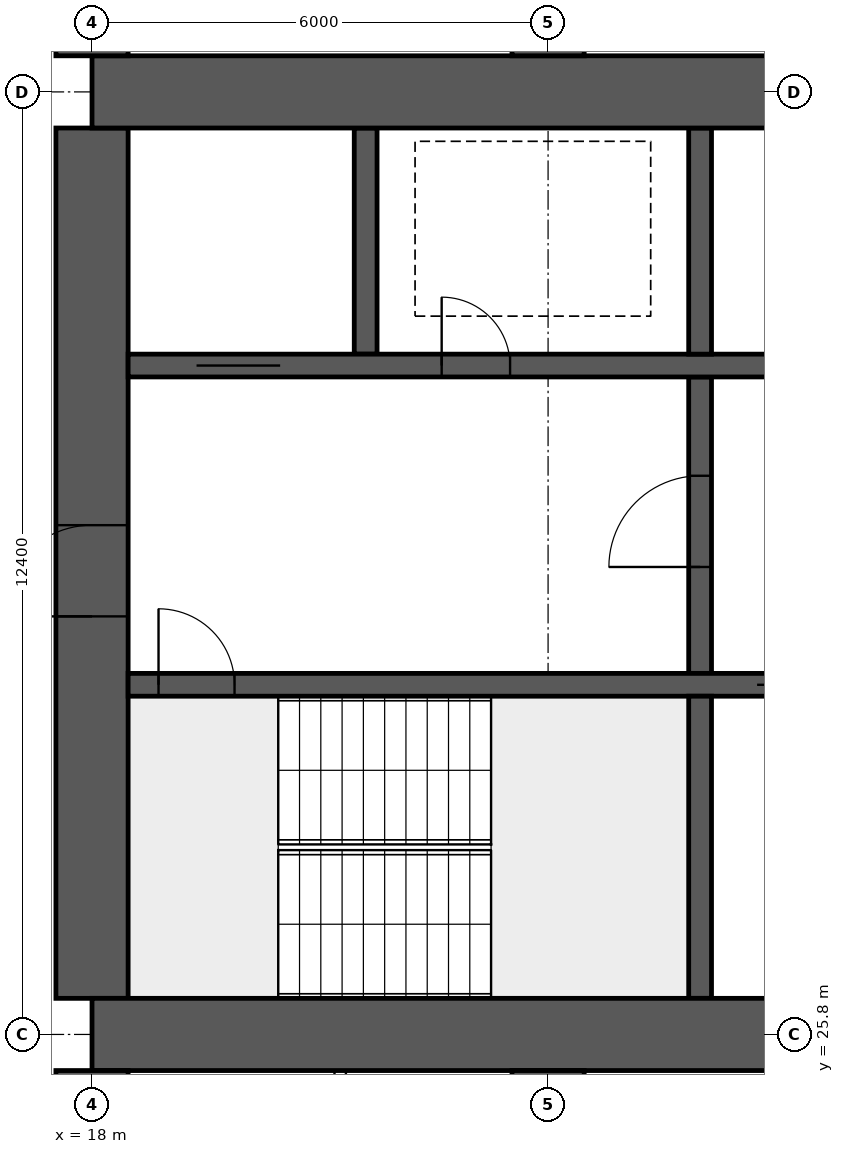
"""IFC4 building model, lengths in metres.
Left out: names, types, materials, properties, quantities, classifications, styles, units other than length and angle.
Written with IfcOpenShell. Run it as: python <this file> out.ifc"""

import sys

from ifc_helpers import new_model, si_unit, direction, frame, frame_2d, origin, place, context, subcontext, project, spatial, rectangle, extrude, element, fill, save


model = new_model("IFC4")
c1 = context("Model", 3, precision=1e-05, world=origin(), true_north=direction((0.0, 1.0)))
c2 = subcontext(c1, "Body", "Model", "MODEL_VIEW")
j1 = project(units=[si_unit("LENGTHUNIT", "METRE"), si_unit("PLANEANGLEUNIT", "RADIAN")], contexts=[c1])
p1 = place(None, origin())
s1 = spatial("IfcSite", under=j1, at=p1, CompositionType="ELEMENT")
p2 = place(p1, origin())
s2 = spatial("IfcBuilding", under=s1, at=p2, CompositionType="ELEMENT")
p3 = place(p2, frame((0.0, 0.0, 80.65)))
s3 = spatial("IfcBuildingStorey", under=s2, at=p3, CompositionType="ELEMENT", Elevation=80.65)
for number, where, z_axis, x_axis in (
    (1, (18.0, 25.8, 0.0), (0.0, 0.0, 1.0), (1.0, 0.0, 0.0)),
    (2, (18.0, 38.2, 0.0), (0.0, 0.0, 1.0), (1.0, 0.0, 0.0)),
):
    element("IfcWall", number, at=place(p3, frame(where, z_axis=z_axis, x_axis=x_axis)), inside=s3, PredefinedType="SHEAR", context=c2, shape_type="SweptSolid", body=[
        extrude(rectangle(XDim=48.0, YDim=0.95, at=frame_2d((24.0, 0.0))), origin(), (0.0, 0.0, 1.0), 3.75),
    ])
p4 = place(p3, frame((18.0, 26.275, 0.0), z_axis=(0.0, 0.0, 1.0), x_axis=(0.0, 1.0, 0.0)))
e3 = element("IfcWall", 3, at=p4, inside=s3, PredefinedType="SHEAR", context=c2, shape_type="SweptSolid", body=[
    extrude(rectangle(XDim=11.45, YDim=0.95, at=frame_2d((5.725, 0.0))), origin(), (0.0, 0.0, 1.0), 3.75),
])
p5 = place(p4, frame((5.025, 0.0, 0.0)))
e4 = element("IfcOpeningElement", 4, at=p5, cuts=e3, PredefinedType="OPENING", context=c2, shape_type="SweptSolid", body=[
    extrude(rectangle(XDim=1.2, YDim=2.1, at=frame_2d((0.6, 1.05))), frame((0.0, 0.485, 0.0), z_axis=(0.0, -1.0, 0.0), x_axis=(1.0, 0.0, 0.0)), (0.0, 0.0, 1.0), 0.97),
])
p6 = place(p3, frame((18.475, 30.4, 0.0), z_axis=(0.0, 0.0, 1.0), x_axis=(1.0, 0.0, 0.0)))
e5 = element("IfcWall", 5, at=p6, inside=s3, PredefinedType="SHEAR", context=c2, shape_type="SweptSolid", body=[
    extrude(rectangle(XDim=47.05, YDim=0.3, at=frame_2d((23.525, 0.0))), origin(), (0.0, 0.0, 1.0), 3.75),
])
p7 = place(p6, frame((0.4, 0.0, 0.0)))
e6 = element("IfcOpeningElement", 6, at=p7, cuts=e5, PredefinedType="OPENING", context=c2, shape_type="SweptSolid", body=[
    extrude(rectangle(XDim=1.0, YDim=2.1, at=frame_2d((0.5, 1.05))), frame((0.0, 0.16, 0.0), z_axis=(0.0, -1.0, 0.0), x_axis=(1.0, 0.0, 0.0)), (0.0, 0.0, 1.0), 0.32),
])
p8 = place(p6, frame((45.65, 0.0, 0.0)))
e7 = element("IfcOpeningElement", 7, at=p8, cuts=e5, PredefinedType="OPENING", context=c2, shape_type="SweptSolid", body=[
    extrude(rectangle(XDim=1.0, YDim=2.1, at=frame_2d((0.5, 1.05))), frame((0.0, 0.16, 0.0), z_axis=(0.0, -1.0, 0.0), x_axis=(1.0, 0.0, 0.0)), (0.0, 0.0, 1.0), 0.32),
])
p9 = place(p6, frame((8.275, 0.0, 0.0)))
e8 = element("IfcOpeningElement", 8, at=p9, cuts=e5, PredefinedType="OPENING", context=c2, shape_type="SweptSolid", body=[
    extrude(rectangle(XDim=1.1, YDim=2.1, at=frame_2d((0.55, 1.05))), frame((0.0, 0.16, 0.0), z_axis=(0.0, -1.0, 0.0), x_axis=(1.0, 0.0, 0.0)), (0.0, 0.0, 1.0), 0.32),
])
p10 = place(p6, frame((10.875, 0.0, 0.0)))
e9 = element("IfcOpeningElement", 9, at=p10, cuts=e5, PredefinedType="OPENING", context=c2, shape_type="SweptSolid", body=[
    extrude(rectangle(XDim=1.1, YDim=2.1, at=frame_2d((0.55, 1.05))), frame((0.0, 0.16, 0.0), z_axis=(0.0, -1.0, 0.0), x_axis=(1.0, 0.0, 0.0)), (0.0, 0.0, 1.0), 0.32),
])
p11 = place(p6, frame((13.475, 0.0, 0.0)))
e10 = element("IfcOpeningElement", 10, at=p11, cuts=e5, PredefinedType="OPENING", context=c2, shape_type="SweptSolid", body=[
    extrude(rectangle(XDim=1.1, YDim=2.1, at=frame_2d((0.55, 1.05))), frame((0.0, 0.16, 0.0), z_axis=(0.0, -1.0, 0.0), x_axis=(1.0, 0.0, 0.0)), (0.0, 0.0, 1.0), 0.32),
])
p12 = place(p6, frame((16.075, 0.0, 0.0)))
e11 = element("IfcOpeningElement", 11, at=p12, cuts=e5, PredefinedType="OPENING", context=c2, shape_type="SweptSolid", body=[
    extrude(rectangle(XDim=1.1, YDim=2.1, at=frame_2d((0.55, 1.05))), frame((0.0, 0.16, 0.0), z_axis=(0.0, -1.0, 0.0), x_axis=(1.0, 0.0, 0.0)), (0.0, 0.0, 1.0), 0.32),
])
p13 = place(p6, frame((30.142, 0.0, 0.0)))
e12 = element("IfcOpeningElement", 12, at=p13, cuts=e5, PredefinedType="OPENING", context=c2, shape_type="SweptSolid", body=[
    extrude(rectangle(XDim=1.1, YDim=2.1, at=frame_2d((0.55, 1.05))), frame((0.0, 0.16, 0.0), z_axis=(0.0, -1.0, 0.0), x_axis=(1.0, 0.0, 0.0)), (0.0, 0.0, 1.0), 0.32),
])
p14 = place(p6, frame((33.675, 0.0, 0.0)))
e13 = element("IfcOpeningElement", 13, at=p14, cuts=e5, PredefinedType="OPENING", context=c2, shape_type="SweptSolid", body=[
    extrude(rectangle(XDim=1.1, YDim=2.1, at=frame_2d((0.55, 1.05))), frame((0.0, 0.16, 0.0), z_axis=(0.0, -1.0, 0.0), x_axis=(1.0, 0.0, 0.0)), (0.0, 0.0, 1.0), 0.32),
])
p15 = place(p6, frame((37.208, 0.0, 0.0)))
e14 = element("IfcOpeningElement", 14, at=p15, cuts=e5, PredefinedType="OPENING", context=c2, shape_type="SweptSolid", body=[
    extrude(rectangle(XDim=1.1, YDim=2.1, at=frame_2d((0.55, 1.05))), frame((0.0, 0.16, 0.0), z_axis=(0.0, -1.0, 0.0), x_axis=(1.0, 0.0, 0.0)), (0.0, 0.0, 1.0), 0.32),
])
p16 = place(p3, frame((18.475, 34.6, 0.0), z_axis=(0.0, 0.0, 1.0), x_axis=(1.0, 0.0, 0.0)))
e15 = element("IfcWall", 15, at=p16, inside=s3, PredefinedType="SHEAR", context=c2, shape_type="SweptSolid", body=[
    extrude(rectangle(XDim=47.05, YDim=0.3, at=frame_2d((23.525, 0.0))), origin(), (0.0, 0.0, 1.0), 3.75),
])
p17 = place(p16, frame((0.9, 0.0, 0.0)))
e16 = element("IfcOpeningElement", 16, at=p17, cuts=e15, PredefinedType="OPENING", context=c2, shape_type="SweptSolid", body=[
    extrude(rectangle(XDim=1.1, YDim=2.1, at=frame_2d((0.55, 1.05))), frame((0.0, 0.16, 0.0), z_axis=(0.0, -1.0, 0.0), x_axis=(1.0, 0.0, 0.0)), (0.0, 0.0, 1.0), 0.32),
])
p18 = place(p16, frame((45.05, 0.0, 0.0)))
e17 = element("IfcOpeningElement", 17, at=p18, cuts=e15, PredefinedType="OPENING", context=c2, shape_type="SweptSolid", body=[
    extrude(rectangle(XDim=1.1, YDim=2.1, at=frame_2d((0.55, 1.05))), frame((0.0, 0.16, 0.0), z_axis=(0.0, -1.0, 0.0), x_axis=(1.0, 0.0, 0.0)), (0.0, 0.0, 1.0), 0.32),
])
p19 = place(p16, frame((4.125, 0.0, 0.0)))
e18 = element("IfcOpeningElement", 18, at=p19, cuts=e15, PredefinedType="OPENING", context=c2, shape_type="SweptSolid", body=[
    extrude(rectangle(XDim=0.9, YDim=2.1, at=frame_2d((0.45, 1.05))), frame((0.0, 0.16, 0.0), z_axis=(0.0, -1.0, 0.0), x_axis=(1.0, 0.0, 0.0)), (0.0, 0.0, 1.0), 0.32),
])
p20 = place(p16, frame((42.025, 0.0, 0.0)))
e19 = element("IfcOpeningElement", 19, at=p20, cuts=e15, PredefinedType="OPENING", context=c2, shape_type="SweptSolid", body=[
    extrude(rectangle(XDim=0.9, YDim=2.1, at=frame_2d((0.45, 1.05))), frame((0.0, 0.16, 0.0), z_axis=(0.0, -1.0, 0.0), x_axis=(1.0, 0.0, 0.0)), (0.0, 0.0, 1.0), 0.32),
])
p21 = place(p16, frame((8.9, 0.0, 0.0)))
e20 = element("IfcOpeningElement", 20, at=p21, cuts=e15, PredefinedType="OPENING", context=c2, shape_type="SweptSolid", body=[
    extrude(rectangle(XDim=0.9, YDim=2.1, at=frame_2d((0.45, 1.05))), frame((0.0, 0.16, 0.0), z_axis=(0.0, -1.0, 0.0), x_axis=(1.0, 0.0, 0.0)), (0.0, 0.0, 1.0), 0.32),
])
p22 = place(p16, frame((12.874, 0.0, 0.0)))
e21 = element("IfcOpeningElement", 21, at=p22, cuts=e15, PredefinedType="OPENING", context=c2, shape_type="SweptSolid", body=[
    extrude(rectangle(XDim=0.9, YDim=2.1, at=frame_2d((0.45, 1.05))), frame((0.0, 0.16, 0.0), z_axis=(0.0, -1.0, 0.0), x_axis=(1.0, 0.0, 0.0)), (0.0, 0.0, 1.0), 0.32),
])
p23 = place(p16, frame((16.521, 0.0, 0.0)))
e22 = element("IfcOpeningElement", 22, at=p23, cuts=e15, PredefinedType="OPENING", context=c2, shape_type="SweptSolid", body=[
    extrude(rectangle(XDim=0.9, YDim=2.1, at=frame_2d((0.45, 1.05))), frame((0.0, 0.16, 0.0), z_axis=(0.0, -1.0, 0.0), x_axis=(1.0, 0.0, 0.0)), (0.0, 0.0, 1.0), 0.32),
])
p24 = place(p16, frame((20.28, 0.0, 0.0)))
e23 = element("IfcOpeningElement", 23, at=p24, cuts=e15, PredefinedType="OPENING", context=c2, shape_type="SweptSolid", body=[
    extrude(rectangle(XDim=0.9, YDim=2.1, at=frame_2d((0.45, 1.05))), frame((0.0, 0.16, 0.0), z_axis=(0.0, -1.0, 0.0), x_axis=(1.0, 0.0, 0.0)), (0.0, 0.0, 1.0), 0.32),
])
p25 = place(p16, frame((24.686, 0.0, 0.0)))
e24 = element("IfcOpeningElement", 24, at=p25, cuts=e15, PredefinedType="OPENING", context=c2, shape_type="SweptSolid", body=[
    extrude(rectangle(XDim=0.9, YDim=2.1, at=frame_2d((0.45, 1.05))), frame((0.0, 0.16, 0.0), z_axis=(0.0, -1.0, 0.0), x_axis=(1.0, 0.0, 0.0)), (0.0, 0.0, 1.0), 0.32),
])
p26 = place(p16, frame((27.483, 0.0, 0.0)))
e25 = element("IfcOpeningElement", 25, at=p26, cuts=e15, PredefinedType="OPENING", context=c2, shape_type="SweptSolid", body=[
    extrude(rectangle(XDim=0.9, YDim=2.1, at=frame_2d((0.45, 1.05))), frame((0.0, 0.16, 0.0), z_axis=(0.0, -1.0, 0.0), x_axis=(1.0, 0.0, 0.0)), (0.0, 0.0, 1.0), 0.32),
])
p27 = place(p16, frame((29.45, 0.0, 0.0)))
e26 = element("IfcOpeningElement", 26, at=p27, cuts=e15, PredefinedType="OPENING", context=c2, shape_type="SweptSolid", body=[
    extrude(rectangle(XDim=0.9, YDim=2.1, at=frame_2d((0.45, 1.05))), frame((0.0, 0.16, 0.0), z_axis=(0.0, -1.0, 0.0), x_axis=(1.0, 0.0, 0.0)), (0.0, 0.0, 1.0), 0.32),
])
p28 = place(p16, frame((31.882, 0.0, 0.0)))
e27 = element("IfcOpeningElement", 27, at=p28, cuts=e15, PredefinedType="OPENING", context=c2, shape_type="SweptSolid", body=[
    extrude(rectangle(XDim=0.9, YDim=2.1, at=frame_2d((0.45, 1.05))), frame((0.0, 0.16, 0.0), z_axis=(0.0, -1.0, 0.0), x_axis=(1.0, 0.0, 0.0)), (0.0, 0.0, 1.0), 0.32),
])
p29 = place(p16, frame((34.617, 0.0, 0.0)))
e28 = element("IfcOpeningElement", 28, at=p29, cuts=e15, PredefinedType="OPENING", context=c2, shape_type="SweptSolid", body=[
    extrude(rectangle(XDim=0.9, YDim=2.1, at=frame_2d((0.45, 1.05))), frame((0.0, 0.16, 0.0), z_axis=(0.0, -1.0, 0.0), x_axis=(1.0, 0.0, 0.0)), (0.0, 0.0, 1.0), 0.32),
])
p30 = place(p16, frame((37.656, 0.0, 0.0)))
e29 = element("IfcOpeningElement", 29, at=p30, cuts=e15, PredefinedType="OPENING", context=c2, shape_type="SweptSolid", body=[
    extrude(rectangle(XDim=0.9, YDim=2.1, at=frame_2d((0.45, 1.05))), frame((0.0, 0.16, 0.0), z_axis=(0.0, -1.0, 0.0), x_axis=(1.0, 0.0, 0.0)), (0.0, 0.0, 1.0), 0.32),
])
p31 = place(p3, frame((26.0, 26.275, 0.0), z_axis=(0.0, 0.0, 1.0), x_axis=(0.0, 1.0, 0.0)))
e30 = element("IfcWall", 30, at=p31, inside=s3, PredefinedType="SHEAR", context=c2, shape_type="SweptSolid", body=[
    extrude(rectangle(XDim=3.975, YDim=0.3, at=frame_2d((1.988, 0.0))), origin(), (0.0, 0.0, 1.0), 3.75),
])
p32 = place(p3, frame((26.0, 30.55, 0.0), z_axis=(0.0, 0.0, 1.0), x_axis=(0.0, 1.0, 0.0)))
e31 = element("IfcWall", 31, at=p32, inside=s3, PredefinedType="SHEAR", context=c2, shape_type="SweptSolid", body=[
    extrude(rectangle(XDim=3.9, YDim=0.3, at=frame_2d((1.95, 0.0))), origin(), (0.0, 0.0, 1.0), 3.75),
])
p33 = place(p32, frame((1.4, 0.0, 0.0)))
e32 = element("IfcOpeningElement", 32, at=p33, cuts=e31, PredefinedType="OPENING", context=c2, shape_type="SweptSolid", body=[
    extrude(rectangle(XDim=1.2, YDim=2.1, at=frame_2d((0.6, 1.05))), frame((0.0, 0.16, 0.0), z_axis=(0.0, -1.0, 0.0), x_axis=(1.0, 0.0, 0.0)), (0.0, 0.0, 1.0), 0.32),
])
for number, where, z_axis, x_axis in (
    (33, (21.6, 34.75, 0.0), (0.0, 0.0, 1.0), (0.0, 1.0, 0.0)),
    (34, (26.0, 34.75, 0.0), (0.0, 0.0, 1.0), (0.0, 1.0, 0.0)),
):
    element("IfcWall", number, at=place(p3, frame(where, z_axis=z_axis, x_axis=x_axis)), inside=s3, PredefinedType="SHEAR", context=c2, shape_type="SweptSolid", body=[
        extrude(rectangle(XDim=2.975, YDim=0.3, at=frame_2d((1.488, 0.0))), origin(), (0.0, 0.0, 1.0), 3.75),
    ])
for number, where, z_axis, x_axis in (
    (35, (18.0, 16.0, 0.0), (0.0, 0.0, 1.0), (0.0, 1.0, 0.0)),
    (36, (18.0, 38.675, 0.0), (0.0, 0.0, 1.0), (0.0, 1.0, 0.0)),
    (37, (24.0, 16.0, 0.0), (0.0, 0.0, 1.0), (0.0, 1.0, 0.0)),
    (38, (24.0, 38.675, 0.0), (0.0, 0.0, 1.0), (0.0, 1.0, 0.0)),
):
    element("IfcWall", number, at=place(p3, frame(where, z_axis=z_axis, x_axis=x_axis)), inside=s3, PredefinedType="SHEAR", context=c2, shape_type="SweptSolid", body=[
        extrude(rectangle(XDim=9.325, YDim=0.95, at=frame_2d((4.663, 0.0))), origin(), (0.0, 0.0, 1.0), 3.75),
    ])
p34 = place(p3, frame((21.265, 16.1, 0.0), z_axis=(0.0, 0.0, 1.0), x_axis=(0.0, 1.0, 0.0)))
e39 = element("IfcWall", 39, at=p34, inside=s3, PredefinedType="PARTITIONING", context=c2, shape_type="SweptSolid", body=[
    extrude(rectangle(XDim=9.225, YDim=0.15, at=frame_2d((4.612, 0.0))), origin(), (0.0, 0.0, 1.0), 3.3),
])
p35 = place(p5, origin())
e40 = element("IfcDoor", 40, at=p35, inside=s3, OperationType="SINGLE_SWING_LEFT", PredefinedType="DOOR", context=c2, shape_type="SweptSolid", body=[
    extrude(rectangle(XDim=1.2, YDim=2.1, at=frame_2d((0.6, 1.05))), frame((0.0, 0.025, 0.0), z_axis=(0.0, -1.0, 0.0), x_axis=(1.0, 0.0, 0.0)), (0.0, 0.0, 1.0), 0.05),
])
fill(e4, e40)
p36 = place(p7, origin())
e41 = element("IfcDoor", 41, at=p36, inside=s3, OperationType="SINGLE_SWING_LEFT", PredefinedType="DOOR", context=c2, shape_type="SweptSolid", body=[
    extrude(rectangle(XDim=1.0, YDim=2.1, at=frame_2d((0.5, 1.05))), frame((0.0, 0.025, 0.0), z_axis=(0.0, -1.0, 0.0), x_axis=(1.0, 0.0, 0.0)), (0.0, 0.0, 1.0), 0.05),
])
fill(e6, e41)
p37 = place(p17, origin())
e42 = element("IfcDoor", 42, at=p37, inside=s3, OperationType="DOUBLE_DOOR_SLIDING", PredefinedType="DOOR", context=c2, shape_type="SweptSolid", body=[
    extrude(rectangle(XDim=1.1, YDim=2.1, at=frame_2d((0.55, 1.05))), frame((0.0, 0.025, 0.0), z_axis=(0.0, -1.0, 0.0), x_axis=(1.0, 0.0, 0.0)), (0.0, 0.0, 1.0), 0.05),
])
fill(e16, e42)
p38 = place(p19, origin())
e43 = element("IfcDoor", 43, at=p38, inside=s3, OperationType="SINGLE_SWING_LEFT", PredefinedType="DOOR", context=c2, shape_type="SweptSolid", body=[
    extrude(rectangle(XDim=0.9, YDim=2.1, at=frame_2d((0.45, 1.05))), frame((0.0, 0.025, 0.0), z_axis=(0.0, -1.0, 0.0), x_axis=(1.0, 0.0, 0.0)), (0.0, 0.0, 1.0), 0.05),
])
fill(e18, e43)
p39 = place(p33, origin())
e44 = element("IfcDoor", 44, at=p39, inside=s3, OperationType="SINGLE_SWING_LEFT", PredefinedType="DOOR", context=c2, shape_type="SweptSolid", body=[
    extrude(rectangle(XDim=1.2, YDim=2.1, at=frame_2d((0.6, 1.05))), frame((0.0, 0.025, 0.0), z_axis=(0.0, -1.0, 0.0), x_axis=(1.0, 0.0, 0.0)), (0.0, 0.0, 1.0), 0.05),
])
fill(e32, e44)
p40 = place(p9, origin())
e45 = element("IfcDoor", 45, at=p40, inside=s3, OperationType="DOUBLE_DOOR_SLIDING", PredefinedType="DOOR", context=c2, shape_type="SweptSolid", body=[
    extrude(rectangle(XDim=1.1, YDim=2.1, at=frame_2d((0.55, 1.05))), frame((0.0, 0.025, 0.0), z_axis=(0.0, -1.0, 0.0), x_axis=(1.0, 0.0, 0.0)), (0.0, 0.0, 1.0), 0.05),
])
fill(e8, e45)
save(model, sys.argv[1])
